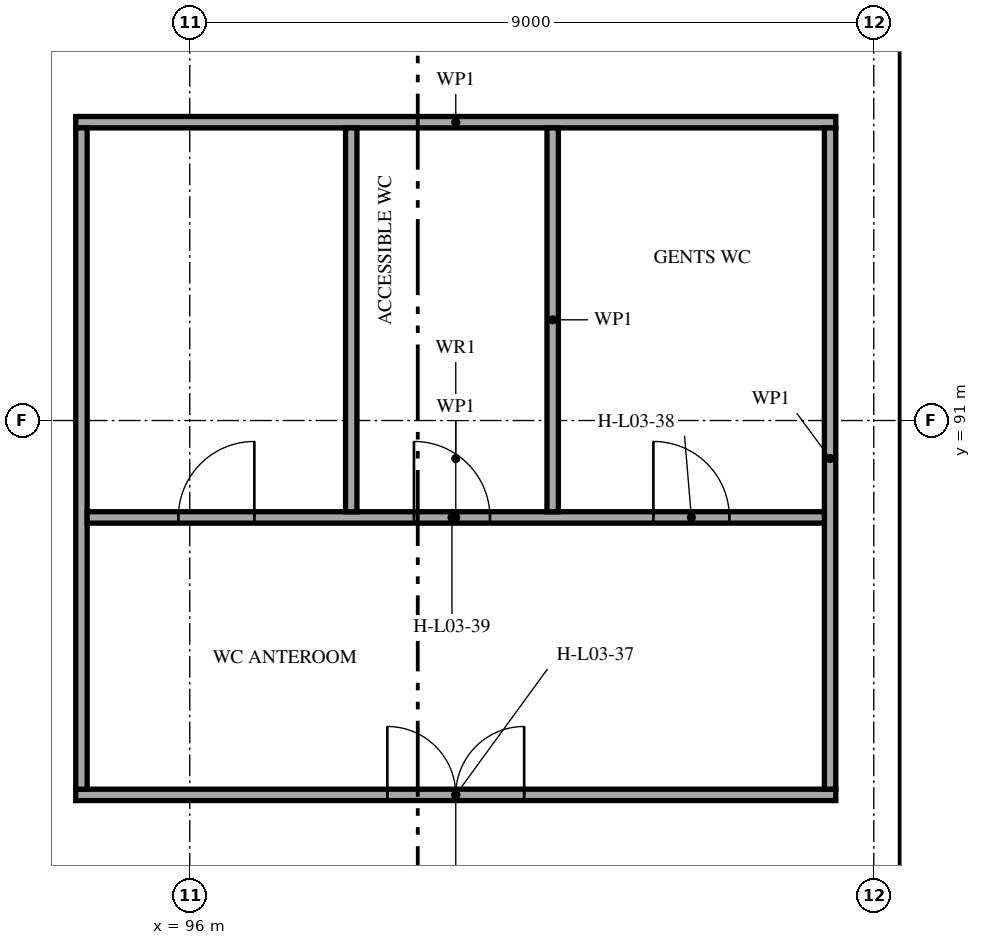
"""IFC4 building model, lengths in metres.
Left out: names, types, materials, properties, quantities, classifications, styles, units other than length and angle.
Written with IfcOpenShell. Run it as: python <this file> out.ifc"""

import sys

from ifc_helpers import new_model, si_unit, direction, frame, frame_2d, origin, place, context, subcontext, project, spatial, rectangle, extrude, element, fill, save


model = new_model("IFC4")
c1 = context("Model", 3, precision=1e-05, world=origin(), true_north=direction((0.0, 1.0)))
c2 = subcontext(c1, "Body", "Model", "MODEL_VIEW")
j1 = project(units=[si_unit("LENGTHUNIT", "METRE"), si_unit("PLANEANGLEUNIT", "RADIAN")], contexts=[c1])
p1 = place(None, origin())
s1 = spatial("IfcSite", under=j1, at=p1, CompositionType="ELEMENT")
p2 = place(p1, origin())
s2 = spatial("IfcBuilding", under=s1, at=p2, CompositionType="ELEMENT")
p3 = place(p2, frame((0.0, 0.0, 15.0)))
s3 = spatial("IfcBuildingStorey", under=s2, at=p3, CompositionType="ELEMENT", Elevation=15.0)
p4 = place(p3, frame((105.575, 46.75, 0.0), z_axis=(0.0, 0.0, 1.0), x_axis=(0.0, 1.0, 0.0)))
e1 = element("IfcWall", 1, at=p4, inside=s3, PredefinedType="SOLIDWALL", context=c2, shape_type="SweptSolid", body=[
    extrude(rectangle(XDim=61.65, YDim=0.45, at=frame_2d((30.825, 0.0))), origin(), (0.0, 0.0, 1.0), 4.2),
])
p5 = place(p3, frame((94.5, 86.075, 0.0), z_axis=(0.0, 0.0, 1.0), x_axis=(1.0, 0.0, 0.0)))
e2 = element("IfcWall", 2, at=p5, inside=s3, PredefinedType="SOLIDWALL", context=c2, shape_type="SweptSolid", body=[
    extrude(rectangle(XDim=10.0, YDim=0.15, at=frame_2d((5.0, 0.0))), origin(), (0.0, 0.0, 1.0), 3.45),
])
p6 = place(p5, frame((4.1, 0.0, 0.0)))
e3 = element("IfcOpeningElement", 3, at=p6, cuts=e2, PredefinedType="OPENING", context=c2, shape_type="SweptSolid", body=[
    extrude(rectangle(XDim=1.8, YDim=2.1, at=frame_2d((0.9, 1.05))), frame((0.0, 0.085, 0.0), z_axis=(0.0, -1.0, 0.0), x_axis=(1.0, 0.0, 0.0)), (0.0, 0.0, 1.0), 0.17),
])
p7 = place(p3, frame((94.5, 94.925, 0.0), z_axis=(0.0, 0.0, 1.0), x_axis=(1.0, 0.0, 0.0)))
e4 = element("IfcWall", 4, at=p7, inside=s3, PredefinedType="SOLIDWALL", context=c2, shape_type="SweptSolid", body=[
    extrude(rectangle(XDim=10.0, YDim=0.15, at=frame_2d((5.0, 0.0))), origin(), (0.0, 0.0, 1.0), 3.45),
])
for number, where, z_axis, x_axis in (
    (5, (104.425, 86.15, 0.0), (0.0, 0.0, 1.0), (0.0, 1.0, 0.0)),
    (6, (94.575, 86.15, 0.0), (0.0, 0.0, 1.0), (0.0, 1.0, 0.0)),
):
    element("IfcWall", number, at=place(p3, frame(where, z_axis=z_axis, x_axis=x_axis)), inside=s3, PredefinedType="SOLIDWALL", context=c2, shape_type="SweptSolid", body=[
        extrude(rectangle(XDim=8.7, YDim=0.15, at=frame_2d((4.35, 0.0))), origin(), (0.0, 0.0, 1.0), 3.45),
    ])
p8 = place(p3, frame((94.65, 89.725, 0.0), z_axis=(0.0, 0.0, 1.0), x_axis=(1.0, 0.0, 0.0)))
e7 = element("IfcWall", 7, at=p8, inside=s3, PredefinedType="SOLIDWALL", context=c2, shape_type="SweptSolid", body=[
    extrude(rectangle(XDim=9.7, YDim=0.15, at=frame_2d((4.85, 0.0))), origin(), (0.0, 0.0, 1.0), 3.45),
])
p9 = place(p8, frame((7.45, 0.0, 0.0)))
e8 = element("IfcOpeningElement", 8, at=p9, cuts=e7, PredefinedType="OPENING", context=c2, shape_type="SweptSolid", body=[
    extrude(rectangle(XDim=1.0, YDim=2.1, at=frame_2d((0.5, 1.05))), frame((0.0, 0.085, 0.0), z_axis=(0.0, -1.0, 0.0), x_axis=(1.0, 0.0, 0.0)), (0.0, 0.0, 1.0), 0.17),
])
p10 = place(p8, frame((4.3, 0.0, 0.0)))
e9 = element("IfcOpeningElement", 9, at=p10, cuts=e7, PredefinedType="OPENING", context=c2, shape_type="SweptSolid", body=[
    extrude(rectangle(XDim=1.0, YDim=2.1, at=frame_2d((0.5, 1.05))), frame((0.0, 0.085, 0.0), z_axis=(0.0, -1.0, 0.0), x_axis=(1.0, 0.0, 0.0)), (0.0, 0.0, 1.0), 0.17),
])
p11 = place(p8, frame((1.2, 0.0, 0.0)))
e10 = element("IfcOpeningElement", 10, at=p11, cuts=e7, PredefinedType="OPENING", context=c2, shape_type="SweptSolid", body=[
    extrude(rectangle(XDim=1.0, YDim=2.1, at=frame_2d((0.5, 1.05))), frame((0.0, 0.085, 0.0), z_axis=(0.0, -1.0, 0.0), x_axis=(1.0, 0.0, 0.0)), (0.0, 0.0, 1.0), 0.17),
])
for number, where, z_axis, x_axis in (
    (11, (100.775, 89.8, 0.0), (0.0, 0.0, 1.0), (0.0, 1.0, 0.0)),
    (12, (98.125, 89.8, 0.0), (0.0, 0.0, 1.0), (0.0, 1.0, 0.0)),
):
    element("IfcWall", number, at=place(p3, frame(where, z_axis=z_axis, x_axis=x_axis)), inside=s3, PredefinedType="SOLIDWALL", context=c2, shape_type="SweptSolid", body=[
        extrude(rectangle(XDim=5.05, YDim=0.15, at=frame_2d((2.525, 0.0))), origin(), (0.0, 0.0, 1.0), 3.45),
    ])
p12 = place(p6, origin())
e13 = element("IfcDoor", 13, at=p12, inside=s3, OperationType="DOUBLE_DOOR_SINGLE_SWING", PredefinedType="DOOR", context=c2, shape_type="SweptSolid", body=[
    extrude(rectangle(XDim=1.8, YDim=2.1, at=frame_2d((0.9, 1.05))), frame((0.0, 0.025, 0.0), z_axis=(0.0, -1.0, 0.0), x_axis=(1.0, 0.0, 0.0)), (0.0, 0.0, 1.0), 0.05),
])
fill(e3, e13)
p13 = place(p9, origin())
e14 = element("IfcDoor", 14, at=p13, inside=s3, OperationType="SINGLE_SWING_LEFT", PredefinedType="DOOR", context=c2, shape_type="SweptSolid", body=[
    extrude(rectangle(XDim=1.0, YDim=2.1, at=frame_2d((0.5, 1.05))), frame((0.0, 0.025, 0.0), z_axis=(0.0, -1.0, 0.0), x_axis=(1.0, 0.0, 0.0)), (0.0, 0.0, 1.0), 0.05),
])
fill(e8, e14)
p14 = place(p10, origin())
e15 = element("IfcDoor", 15, at=p14, inside=s3, OperationType="SINGLE_SWING_LEFT", PredefinedType="DOOR", context=c2, shape_type="SweptSolid", body=[
    extrude(rectangle(XDim=1.0, YDim=2.1, at=frame_2d((0.5, 1.05))), frame((0.0, 0.025, 0.0), z_axis=(0.0, -1.0, 0.0), x_axis=(1.0, 0.0, 0.0)), (0.0, 0.0, 1.0), 0.05),
])
fill(e9, e15)
p15 = place(p11, origin())
e16 = element("IfcDoor", 16, at=p15, inside=s3, OperationType="SINGLE_SWING_RIGHT", PredefinedType="DOOR", context=c2, shape_type="SweptSolid", body=[
    extrude(rectangle(XDim=1.0, YDim=2.1, at=frame_2d((0.5, 1.05))), frame((0.0, 0.025, 0.0), z_axis=(0.0, -1.0, 0.0), x_axis=(1.0, 0.0, 0.0)), (0.0, 0.0, 1.0), 0.05),
])
fill(e10, e16)
save(model, sys.argv[1])
